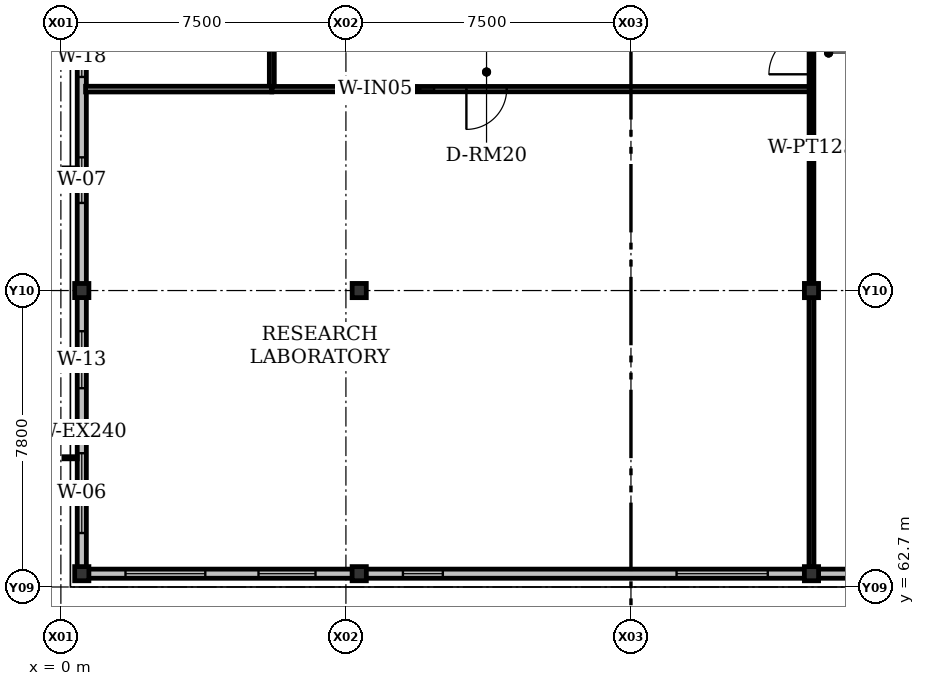
"""IFC4 building model, lengths in metres.
Left out: names, types, materials, properties, quantities, classifications, styles, units other than length and angle.
Written with IfcOpenShell. Run it as: python <this file> out.ifc"""

import sys

from ifc_helpers import new_model, si_unit, direction, frame, frame_2d, origin, origin_2d, place, context, subcontext, project, spatial, rectangle, i_section, extrude, element, fill, save


model = new_model("IFC4")
c1 = context("Model", 3, precision=1e-05, world=origin(), true_north=direction((0.0, 1.0)))
c2 = subcontext(c1, "Body", "Model", "MODEL_VIEW")
j1 = project(units=[si_unit("LENGTHUNIT", "METRE"), si_unit("PLANEANGLEUNIT", "RADIAN")], contexts=[c1])
p1 = place(None, origin())
s1 = spatial("IfcSite", under=j1, at=p1, CompositionType="ELEMENT")
p2 = place(p1, origin())
s2 = spatial("IfcBuilding", under=s1, at=p2, CompositionType="ELEMENT")
p3 = place(p2, frame((0.0, 0.0, 22.5)))
s3 = spatial("IfcBuildingStorey", under=s2, at=p3, CompositionType="ELEMENT", Elevation=22.5)
for number, where, z_axis, x_axis in (
    (1, (0.55, 63.05, 0.0), (0.0, 0.0, 1.0), (1.0, 0.0, 0.0)),
    (2, (7.85, 63.05, 0.0), (0.0, 0.0, 1.0), (1.0, 0.0, 0.0)),
    (3, (19.75, 63.05, 0.0), (0.0, 0.0, 1.0), (1.0, 0.0, 0.0)),
    (4, (0.55, 70.5, 0.0), (0.0, 0.0, 1.0), (1.0, 0.0, 0.0)),
    (5, (7.85, 70.5, 0.0), (0.0, 0.0, 1.0), (0.0, 1.0, 0.0)),
    (6, (19.75, 70.5, 0.0), (0.0, 0.0, 1.0), (0.0, 1.0, 0.0)),
):
    element("IfcColumn", number, at=place(p3, frame(where, z_axis=z_axis, x_axis=x_axis)), inside=s3, PredefinedType="COLUMN", context=c2, shape_type="SweptSolid", body=[
        extrude(i_section(OverallWidth=0.374, OverallDepth=0.372, WebThickness=0.016, FlangeThickness=0.026, FilletRadius=0.015, at=origin_2d()), origin(), (0.0, 0.0, 1.0), 4.2),
    ])
p4 = place(p3, frame((0.55, 63.05, 0.0), z_axis=(0.0, 0.0, 1.0), x_axis=(0.0, 1.0, 0.0)))
e7 = element("IfcWall", 7, at=p4, inside=s3, PredefinedType="SOLIDWALL", context=c2, shape_type="SweptSolid", body=[
    extrude(rectangle(XDim=7.45, YDim=0.24, at=frame_2d((3.725, 0.0))), origin(), (0.0, 0.0, 1.0), 3.557),
])
p5 = place(p4, frame((1.07, 0.0, 0.92)))
e8 = element("IfcOpeningElement", 8, at=p5, cuts=e7, PredefinedType="OPENING", context=c2, shape_type="SweptSolid", body=[
    extrude(rectangle(XDim=2.1, YDim=1.4, at=frame_2d((1.05, 0.7))), frame((0.0, 0.12, 0.0), z_axis=(0.0, -1.0, 0.0), x_axis=(1.0, 0.0, 0.0)), (0.0, 0.0, 1.0), 0.24),
])
p6 = place(p4, frame((4.88, 0.0, 0.92)))
e9 = element("IfcOpeningElement", 9, at=p6, cuts=e7, PredefinedType="OPENING", context=c2, shape_type="SweptSolid", body=[
    extrude(rectangle(XDim=1.5, YDim=1.7, at=frame_2d((0.75, 0.85))), frame((0.0, 0.12, 0.0), z_axis=(0.0, -1.0, 0.0), x_axis=(1.0, 0.0, 0.0)), (0.0, 0.0, 1.0), 0.24),
])
p7 = place(p3, frame((0.55, 70.5, 0.0), z_axis=(0.0, 0.0, 1.0), x_axis=(0.0, 1.0, 0.0)))
e10 = element("IfcWall", 10, at=p7, inside=s3, PredefinedType="SOLIDWALL", context=c2, shape_type="SweptSolid", body=[
    extrude(rectangle(XDim=7.5, YDim=0.24, at=frame_2d((3.75, 0.0))), origin(), (0.0, 0.0, 1.0), 3.557),
])
p8 = place(p7, frame((2.305, 0.0, 0.92)))
e11 = element("IfcOpeningElement", 11, at=p8, cuts=e10, PredefinedType="OPENING", context=c2, shape_type="SweptSolid", body=[
    extrude(rectangle(XDim=1.2, YDim=1.55, at=frame_2d((0.6, 0.775))), frame((0.0, 0.12, 0.0), z_axis=(0.0, -1.0, 0.0), x_axis=(1.0, 0.0, 0.0)), (0.0, 0.0, 1.0), 0.24),
])
p9 = place(p7, frame((5.62, 0.0, 0.92)))
e12 = element("IfcOpeningElement", 12, at=p9, cuts=e10, PredefinedType="OPENING", context=c2, shape_type="SweptSolid", body=[
    extrude(rectangle(XDim=1.05, YDim=1.3, at=frame_2d((0.525, 0.65))), frame((0.0, 0.12, 0.0), z_axis=(0.0, -1.0, 0.0), x_axis=(1.0, 0.0, 0.0)), (0.0, 0.0, 1.0), 0.24),
])
p10 = place(p3, frame((7.85, 63.05, 0.0), z_axis=(0.0, 0.0, 1.0), x_axis=(-1.0, 0.0, 0.0)))
e13 = element("IfcWall", 13, at=p10, inside=s3, PredefinedType="SOLIDWALL", context=c2, shape_type="SweptSolid", body=[
    extrude(rectangle(XDim=7.3, YDim=0.24, at=frame_2d((3.65, 0.0))), origin(), (0.0, 0.0, 1.0), 3.557),
])
p11 = place(p10, frame((1.15, 0.0, 0.92)))
e14 = element("IfcOpeningElement", 14, at=p11, cuts=e13, PredefinedType="OPENING", context=c2, shape_type="SweptSolid", body=[
    extrude(rectangle(XDim=1.5, YDim=1.55, at=frame_2d((0.75, 0.775))), frame((0.0, 0.12, 0.0), z_axis=(0.0, -1.0, 0.0), x_axis=(1.0, 0.0, 0.0)), (0.0, 0.0, 1.0), 0.24),
])
p12 = place(p10, frame((4.05, 0.0, 0.92)))
e15 = element("IfcOpeningElement", 15, at=p12, cuts=e13, PredefinedType="OPENING", context=c2, shape_type="SweptSolid", body=[
    extrude(rectangle(XDim=2.1, YDim=1.7, at=frame_2d((1.05, 0.85))), frame((0.0, 0.12, 0.0), z_axis=(0.0, -1.0, 0.0), x_axis=(1.0, 0.0, 0.0)), (0.0, 0.0, 1.0), 0.24),
])
p13 = place(p3, frame((19.75, 63.05, 0.0), z_axis=(0.0, 0.0, 1.0), x_axis=(-1.0, 0.0, 0.0)))
e16 = element("IfcWall", 16, at=p13, inside=s3, PredefinedType="SOLIDWALL", context=c2, shape_type="SweptSolid", body=[
    extrude(rectangle(XDim=11.9, YDim=0.24, at=frame_2d((5.95, 0.0))), origin(), (0.0, 0.0, 1.0), 3.557),
])
p14 = place(p13, frame((1.15, 0.0, 0.92)))
e17 = element("IfcOpeningElement", 17, at=p14, cuts=e16, PredefinedType="OPENING", context=c2, shape_type="SweptSolid", body=[
    extrude(rectangle(XDim=2.4, YDim=1.55, at=frame_2d((1.2, 0.775))), frame((0.0, 0.12, 0.0), z_axis=(0.0, -1.0, 0.0), x_axis=(1.0, 0.0, 0.0)), (0.0, 0.0, 1.0), 0.24),
])
p15 = place(p13, frame((9.7, 0.0, 0.92)))
e18 = element("IfcOpeningElement", 18, at=p15, cuts=e16, PredefinedType="OPENING", context=c2, shape_type="SweptSolid", body=[
    extrude(rectangle(XDim=1.05, YDim=1.3, at=frame_2d((0.525, 0.65))), frame((0.0, 0.12, 0.0), z_axis=(0.0, -1.0, 0.0), x_axis=(1.0, 0.0, 0.0)), (0.0, 0.0, 1.0), 0.24),
])
p16 = place(p3, frame((26.55, 63.05, 0.0), z_axis=(0.0, 0.0, 1.0), x_axis=(-1.0, 0.0, 0.0)))
e19 = element("IfcWall", 19, at=p16, inside=s3, PredefinedType="SOLIDWALL", context=c2, shape_type="SweptSolid", body=[
    extrude(rectangle(XDim=6.8, YDim=0.24, at=frame_2d((3.4, 0.0))), origin(), (0.0, 0.0, 1.0), 3.557),
])
p17 = place(p16, frame((1.15, 0.0, 0.92)))
e20 = element("IfcOpeningElement", 20, at=p17, cuts=e19, PredefinedType="OPENING", context=c2, shape_type="SweptSolid", body=[
    extrude(rectangle(XDim=2.1, YDim=1.7, at=frame_2d((1.05, 0.85))), frame((0.0, 0.12, 0.0), z_axis=(0.0, -1.0, 0.0), x_axis=(1.0, 0.0, 0.0)), (0.0, 0.0, 1.0), 0.24),
])
p18 = place(p16, frame((4.3, 0.0, 0.92)))
e21 = element("IfcOpeningElement", 21, at=p18, cuts=e19, PredefinedType="OPENING", context=c2, shape_type="SweptSolid", body=[
    extrude(rectangle(XDim=1.35, YDim=1.4, at=frame_2d((0.675, 0.7))), frame((0.0, 0.12, 0.0), z_axis=(0.0, -1.0, 0.0), x_axis=(1.0, 0.0, 0.0)), (0.0, 0.0, 1.0), 0.24),
])
p19 = place(p3, frame((5.55, 75.8, 0.0), z_axis=(0.0, 0.0, 1.0), x_axis=(0.0, 1.0, 0.0)))
e22 = element("IfcWall", 22, at=p19, inside=s3, PredefinedType="PARTITIONING", context=c2, shape_type="SweptSolid", body=[
    extrude(rectangle(XDim=9.4, YDim=0.13, at=frame_2d((4.7, 0.0))), origin(), (0.0, 0.0, 1.0), 3.277),
])
p20 = place(p19, frame((4.2, 0.0, 0.0)))
e23 = element("IfcOpeningElement", 23, at=p20, cuts=e22, PredefinedType="OPENING", context=c2, shape_type="SweptSolid", body=[
    extrude(rectangle(XDim=1.0, YDim=2.2, at=frame_2d((0.5, 1.1))), frame((0.0, 0.065, 0.0), z_axis=(0.0, -1.0, 0.0), x_axis=(1.0, 0.0, 0.0)), (0.0, 0.0, 1.0), 0.13),
])
p21 = place(p19, frame((6.05, 0.0, 0.92)))
e24 = element("IfcOpeningElement", 24, at=p21, cuts=e22, PredefinedType="OPENING", context=c2, shape_type="SweptSolid", body=[
    extrude(rectangle(XDim=0.95, YDim=1.1, at=frame_2d((0.475, 0.55))), frame((0.0, 0.065, 0.0), z_axis=(0.0, -1.0, 0.0), x_axis=(1.0, 0.0, 0.0)), (0.0, 0.0, 1.0), 0.13),
])
p22 = place(p3, frame((0.65, 75.8, 0.0), z_axis=(0.0, 0.0, 1.0), x_axis=(1.0, 0.0, 0.0)))
e25 = element("IfcWall", 25, at=p22, inside=s3, PredefinedType="PARTITIONING", context=c2, shape_type="SweptSolid", body=[
    extrude(rectangle(XDim=4.9, YDim=0.15, at=frame_2d((2.45, 0.0))), origin(), (0.0, 0.0, 1.0), 3.95),
])
p23 = place(p3, frame((19.75, 75.8, 0.0), z_axis=(0.0, 0.0, 1.0), x_axis=(-1.0, 0.0, 0.0)))
e26 = element("IfcWall", 26, at=p23, inside=s3, PredefinedType="PARTITIONING", context=c2, shape_type="SweptSolid", body=[
    extrude(rectangle(XDim=14.2, YDim=0.14, at=frame_2d((7.1, 0.0))), origin(), (0.0, 0.0, 1.0), 3.507),
])
p24 = place(p23, frame((8.02, 0.0, 0.0)))
e27 = element("IfcOpeningElement", 27, at=p24, cuts=e26, PredefinedType="OPENING", context=c2, shape_type="SweptSolid", body=[
    extrude(rectangle(XDim=1.06, YDim=2.25, at=frame_2d((0.53, 1.125))), frame((0.0, 0.07, 0.0), z_axis=(0.0, -1.0, 0.0), x_axis=(1.0, 0.0, 0.0)), (0.0, 0.0, 1.0), 0.14),
])
p25 = place(p23, frame((9.93, 0.0, 0.92)))
e28 = element("IfcOpeningElement", 28, at=p25, cuts=e26, PredefinedType="OPENING", context=c2, shape_type="SweptSolid", body=[
    extrude(rectangle(XDim=0.9, YDim=1.2, at=frame_2d((0.45, 0.6))), frame((0.0, 0.07, 0.0), z_axis=(0.0, -1.0, 0.0), x_axis=(1.0, 0.0, 0.0)), (0.0, 0.0, 1.0), 0.14),
])
p26 = place(p3, frame((19.75, 63.231, 0.0), z_axis=(0.0, 0.0, 1.0), x_axis=(0.0, 1.0, 0.0)))
e29 = element("IfcWall", 29, at=p26, inside=s3, PredefinedType="PARTITIONING", context=c2, shape_type="SweptSolid", body=[
    extrude(rectangle(XDim=7.087, YDim=0.13, at=frame_2d((3.543, 0.0))), origin(), (0.0, 0.0, 1.0), 3.507),
])
p27 = place(p3, frame((19.75, 70.682, 0.0), z_axis=(0.0, 0.0, 1.0), x_axis=(0.0, 1.0, 0.0)))
e30 = element("IfcWall", 30, at=p27, inside=s3, PredefinedType="PARTITIONING", context=c2, shape_type="SweptSolid", body=[
    extrude(rectangle(XDim=7.137, YDim=0.125, at=frame_2d((3.569, 0.0))), origin(), (0.0, 0.0, 1.0), 3.507),
])
p28 = place(p27, frame((5.508, 0.0, 0.0)))
e31 = element("IfcOpeningElement", 31, at=p28, cuts=e30, PredefinedType="OPENING", context=c2, shape_type="SweptSolid", body=[
    extrude(rectangle(XDim=1.12, YDim=2.25, at=frame_2d((0.56, 1.125))), frame((0.0, 0.062, 0.0), z_axis=(0.0, -1.0, 0.0), x_axis=(1.0, 0.0, 0.0)), (0.0, 0.0, 1.0), 0.125),
])
p29 = place(p5, origin())
e32 = element("IfcWindow", 32, at=p29, inside=s3, PartitioningType="DOUBLE_PANEL_VERTICAL", PredefinedType="WINDOW", context=c2, shape_type="SweptSolid", body=[
    extrude(rectangle(XDim=2.1, YDim=1.4, at=frame_2d((1.05, 0.7))), frame((0.0, 0.03, 0.0), z_axis=(0.0, -1.0, 0.0), x_axis=(1.0, 0.0, 0.0)), (0.0, 0.0, 1.0), 0.06),
])
fill(e8, e32)
p30 = place(p6, origin())
e33 = element("IfcWindow", 33, at=p30, inside=s3, PartitioningType="SINGLE_PANEL", PredefinedType="WINDOW", context=c2, shape_type="SweptSolid", body=[
    extrude(rectangle(XDim=1.5, YDim=1.7, at=frame_2d((0.75, 0.85))), frame((0.0, 0.03, 0.0), z_axis=(0.0, -1.0, 0.0), x_axis=(1.0, 0.0, 0.0)), (0.0, 0.0, 1.0), 0.06),
])
fill(e9, e33)
p31 = place(p8, origin())
e34 = element("IfcWindow", 34, at=p31, inside=s3, PartitioningType="SINGLE_PANEL", PredefinedType="WINDOW", context=c2, shape_type="SweptSolid", body=[
    extrude(rectangle(XDim=1.2, YDim=1.55, at=frame_2d((0.6, 0.775))), frame((0.0, 0.03, 0.0), z_axis=(0.0, -1.0, 0.0), x_axis=(1.0, 0.0, 0.0)), (0.0, 0.0, 1.0), 0.06),
])
fill(e11, e34)
p32 = place(p9, origin())
e35 = element("IfcWindow", 35, at=p32, inside=s3, PartitioningType="SINGLE_PANEL", PredefinedType="WINDOW", context=c2, shape_type="SweptSolid", body=[
    extrude(rectangle(XDim=1.05, YDim=1.3, at=frame_2d((0.525, 0.65))), frame((0.0, 0.03, 0.0), z_axis=(0.0, -1.0, 0.0), x_axis=(1.0, 0.0, 0.0)), (0.0, 0.0, 1.0), 0.06),
])
fill(e12, e35)
p33 = place(p11, origin())
e36 = element("IfcWindow", 36, at=p33, inside=s3, PartitioningType="SINGLE_PANEL", PredefinedType="WINDOW", context=c2, shape_type="SweptSolid", body=[
    extrude(rectangle(XDim=1.5, YDim=1.55, at=frame_2d((0.75, 0.775))), frame((0.0, 0.03, 0.0), z_axis=(0.0, -1.0, 0.0), x_axis=(1.0, 0.0, 0.0)), (0.0, 0.0, 1.0), 0.06),
])
fill(e14, e36)
p34 = place(p12, origin())
e37 = element("IfcWindow", 37, at=p34, inside=s3, PartitioningType="DOUBLE_PANEL_VERTICAL", PredefinedType="WINDOW", context=c2, shape_type="SweptSolid", body=[
    extrude(rectangle(XDim=2.1, YDim=1.7, at=frame_2d((1.05, 0.85))), frame((0.0, 0.03, 0.0), z_axis=(0.0, -1.0, 0.0), x_axis=(1.0, 0.0, 0.0)), (0.0, 0.0, 1.0), 0.06),
])
fill(e15, e37)
p35 = place(p14, origin())
e38 = element("IfcWindow", 38, at=p35, inside=s3, PartitioningType="DOUBLE_PANEL_VERTICAL", PredefinedType="WINDOW", context=c2, shape_type="SweptSolid", body=[
    extrude(rectangle(XDim=2.4, YDim=1.55, at=frame_2d((1.2, 0.775))), frame((0.0, 0.03, 0.0), z_axis=(0.0, -1.0, 0.0), x_axis=(1.0, 0.0, 0.0)), (0.0, 0.0, 1.0), 0.06),
])
fill(e17, e38)
p36 = place(p15, origin())
e39 = element("IfcWindow", 39, at=p36, inside=s3, PartitioningType="SINGLE_PANEL", PredefinedType="WINDOW", context=c2, shape_type="SweptSolid", body=[
    extrude(rectangle(XDim=1.05, YDim=1.3, at=frame_2d((0.525, 0.65))), frame((0.0, 0.03, 0.0), z_axis=(0.0, -1.0, 0.0), x_axis=(1.0, 0.0, 0.0)), (0.0, 0.0, 1.0), 0.06),
])
fill(e18, e39)
p37 = place(p24, origin())
e40 = element("IfcDoor", 40, at=p37, inside=s3, OperationType="SINGLE_SWING_RIGHT", PredefinedType="DOOR", context=c2, shape_type="SweptSolid", body=[
    extrude(rectangle(XDim=1.06, YDim=2.25, at=frame_2d((0.53, 1.125))), frame((0.0, 0.025, 0.0), z_axis=(0.0, -1.0, 0.0), x_axis=(1.0, 0.0, 0.0)), (0.0, 0.0, 1.0), 0.05),
])
fill(e27, e40)
p38 = place(p25, origin())
e41 = element("IfcWindow", 41, at=p38, inside=s3, PartitioningType="SINGLE_PANEL", PredefinedType="WINDOW", context=c2, shape_type="SweptSolid", body=[
    extrude(rectangle(XDim=0.9, YDim=1.2, at=frame_2d((0.45, 0.6))), frame((0.0, 0.03, 0.0), z_axis=(0.0, -1.0, 0.0), x_axis=(1.0, 0.0, 0.0)), (0.0, 0.0, 1.0), 0.06),
])
fill(e28, e41)
p39 = place(p28, origin())
e42 = element("IfcDoor", 42, at=p39, inside=s3, OperationType="SINGLE_SWING_LEFT", PredefinedType="DOOR", context=c2, shape_type="SweptSolid", body=[
    extrude(rectangle(XDim=1.12, YDim=2.25, at=frame_2d((0.56, 1.125))), frame((0.0, 0.025, 0.0), z_axis=(0.0, -1.0, 0.0), x_axis=(1.0, 0.0, 0.0)), (0.0, 0.0, 1.0), 0.05),
])
fill(e31, e42)
save(model, sys.argv[1])
